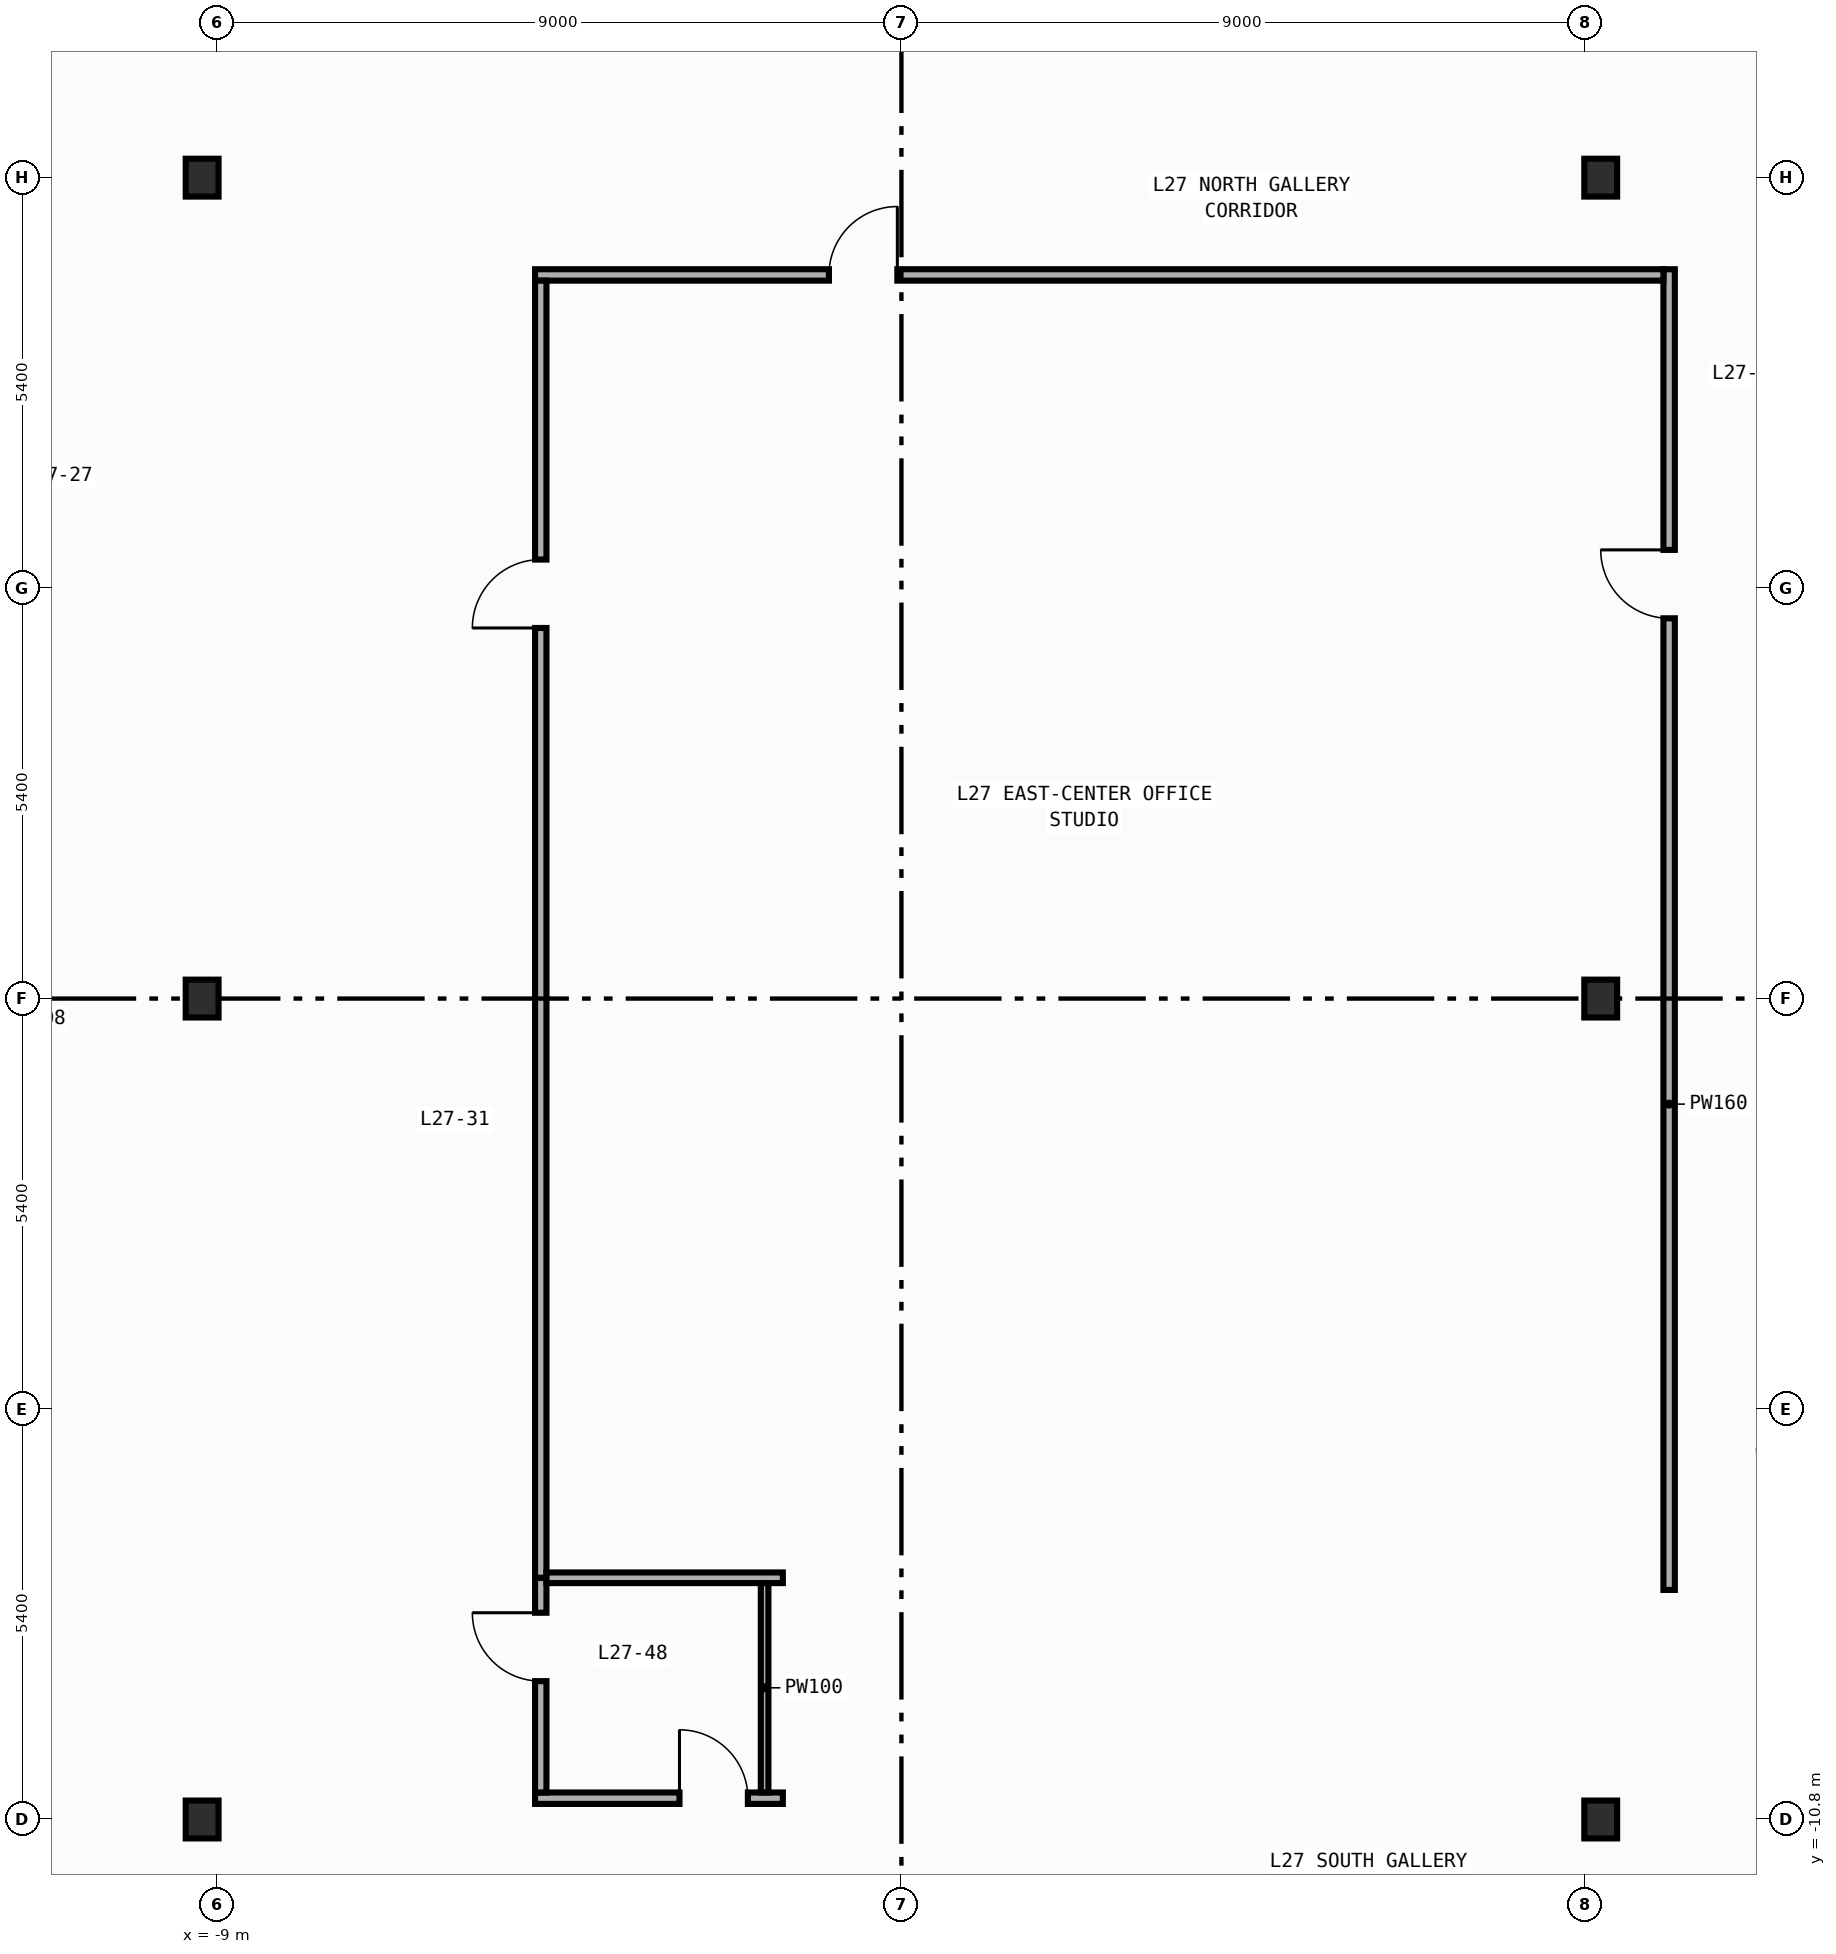
"""IFC4 building model, lengths in metres.
Left out: names, types, materials, properties, quantities, classifications, styles, units other than length and angle.
Written with IfcOpenShell. Run it as: python <this file> out.ifc"""

import sys

from ifc_helpers import new_model, si_unit, direction, frame, frame_2d, origin, origin_2d, place, context, subcontext, project, spatial, rectangle, i_section, extrude, element, fill, save


model = new_model("IFC4")
c1 = context("Model", 3, precision=1e-05, world=origin(), true_north=direction((0.0, 1.0)))
c2 = subcontext(c1, "Body", "Model", "MODEL_VIEW")
j1 = project(units=[si_unit("LENGTHUNIT", "METRE"), si_unit("PLANEANGLEUNIT", "RADIAN")], contexts=[c1])
p1 = place(None, origin())
s1 = spatial("IfcSite", under=j1, at=p1, CompositionType="ELEMENT")
p2 = place(p1, origin())
s2 = spatial("IfcBuilding", under=s1, at=p2, CompositionType="ELEMENT")
p3 = place(p2, frame((0.0, 0.0, 118.4)))
s3 = spatial("IfcBuildingStorey", under=s2, at=p3, CompositionType="ELEMENT", Elevation=118.4)
for number, where, z_axis, x_axis in (
    (1, (-9.2, -10.8, 0.0), (0.0, 0.0, 1.0), (1.0, 0.0, 0.0)),
    (2, (-9.2, 0.0, 0.0), (0.0, 0.0, 1.0), (1.0, 0.0, 0.0)),
    (3, (-9.2, 10.8, 0.0), (0.0, 0.0, 1.0), (1.0, 0.0, 0.0)),
    (4, (9.2, -10.8, 0.0), (0.0, 0.0, 1.0), (1.0, 0.0, 0.0)),
    (5, (9.2, 0.0, 0.0), (0.0, 0.0, 1.0), (1.0, 0.0, 0.0)),
    (6, (9.2, 10.8, 0.0), (0.0, 0.0, 1.0), (1.0, 0.0, 0.0)),
):
    element("IfcColumn", number, at=place(p3, frame(where, z_axis=z_axis, x_axis=x_axis)), inside=s3, PredefinedType="COLUMN", context=c2, shape_type="SweptSolid", body=[
        extrude(i_section(OverallWidth=0.432, OverallDepth=0.498, WebThickness=0.045, FlangeThickness=0.07, FilletRadius=0.022, at=origin_2d()), origin(), (0.0, 0.0, 1.0), 4.2),
    ])
p4 = place(p3, frame((10.1, -7.78, 0.0), z_axis=(0.0, 0.0, 1.0), x_axis=(0.0, 1.0, 0.0)))
e7 = element("IfcWall", 7, at=p4, inside=s3, PredefinedType="PARTITIONING", context=c2, shape_type="SweptSolid", body=[
    extrude(rectangle(XDim=17.375, YDim=0.15, at=frame_2d((8.688, 0.0))), origin(), (0.0, 0.0, 1.0), 3.94),
])
p5 = place(p4, frame((12.783, 0.0, 0.0)))
e8 = element("IfcOpeningElement", 8, at=p5, cuts=e7, PredefinedType="OPENING", context=c2, shape_type="SweptSolid", body=[
    extrude(rectangle(XDim=0.9, YDim=2.15, at=frame_2d((0.45, 1.075))), frame((0.0, 0.085, 0.0), z_axis=(0.0, -1.0, 0.0), x_axis=(1.0, 0.0, 0.0)), (0.0, 0.0, 1.0), 0.17),
])
p6 = place(p3, frame((-4.82, 9.52, 0.0), z_axis=(0.0, 0.0, 1.0), x_axis=(1.0, 0.0, 0.0)))
e9 = element("IfcWall", 9, at=p6, inside=s3, PredefinedType="PARTITIONING", context=c2, shape_type="SweptSolid", body=[
    extrude(rectangle(XDim=14.845, YDim=0.15, at=frame_2d((7.422, 0.0))), origin(), (0.0, 0.0, 1.0), 3.94),
])
p7 = place(p6, frame((3.866, 0.0, 0.0)))
e10 = element("IfcOpeningElement", 10, at=p7, cuts=e9, PredefinedType="OPENING", context=c2, shape_type="SweptSolid", body=[
    extrude(rectangle(XDim=0.9, YDim=2.15, at=frame_2d((0.45, 1.075))), frame((0.0, 0.085, 0.0), z_axis=(0.0, -1.0, 0.0), x_axis=(1.0, 0.0, 0.0)), (0.0, 0.0, 1.0), 0.17),
])
p8 = place(p3, frame((-4.82, -10.52, 0.0), z_axis=(0.0, 0.0, 1.0), x_axis=(1.0, 0.0, 0.0)))
e11 = element("IfcWall", 11, at=p8, inside=s3, PredefinedType="PARTITIONING", context=c2, shape_type="SweptSolid", body=[
    extrude(rectangle(XDim=3.26, YDim=0.15, at=frame_2d((1.63, 0.0))), origin(), (0.0, 0.0, 1.0), 3.24),
])
p9 = place(p8, frame((1.9, 0.0, 0.0)))
e12 = element("IfcOpeningElement", 12, at=p9, cuts=e11, PredefinedType="OPENING", context=c2, shape_type="SweptSolid", body=[
    extrude(rectangle(XDim=0.9, YDim=2.15, at=frame_2d((0.45, 1.075))), frame((0.0, 0.085, 0.0), z_axis=(0.0, -1.0, 0.0), x_axis=(1.0, 0.0, 0.0)), (0.0, 0.0, 1.0), 0.17),
])
p10 = place(p3, frame((-4.745, -10.445, 0.0), z_axis=(0.0, 0.0, 1.0), x_axis=(0.0, 1.0, 0.0)))
e13 = element("IfcWall", 13, at=p10, inside=s3, PredefinedType="PARTITIONING", context=c2, shape_type="SweptSolid", body=[
    extrude(rectangle(XDim=2.825, YDim=0.15, at=frame_2d((1.413, 0.0))), origin(), (0.0, 0.0, 1.0), 3.49),
])
p11 = place(p10, frame((1.465, 0.0, 0.0)))
e14 = element("IfcOpeningElement", 14, at=p11, cuts=e13, PredefinedType="OPENING", context=c2, shape_type="SweptSolid", body=[
    extrude(rectangle(XDim=0.9, YDim=2.15, at=frame_2d((0.45, 1.075))), frame((0.0, 0.085, 0.0), z_axis=(0.0, -1.0, 0.0), x_axis=(1.0, 0.0, 0.0)), (0.0, 0.0, 1.0), 0.17),
])
p12 = place(p3, frame((-4.745, -7.62, 0.0), z_axis=(0.0, 0.0, 1.0), x_axis=(0.0, 1.0, 0.0)))
e15 = element("IfcWall", 15, at=p12, inside=s3, PredefinedType="PARTITIONING", context=c2, shape_type="SweptSolid", body=[
    extrude(rectangle(XDim=17.065, YDim=0.15, at=frame_2d((8.533, 0.0))), origin(), (0.0, 0.0, 1.0), 3.49),
])
p13 = place(p12, frame((12.496, 0.0, 0.0)))
e16 = element("IfcOpeningElement", 16, at=p13, cuts=e15, PredefinedType="OPENING", context=c2, shape_type="SweptSolid", body=[
    extrude(rectangle(XDim=0.9, YDim=2.15, at=frame_2d((0.45, 1.075))), frame((0.0, 0.085, 0.0), z_axis=(0.0, -1.0, 0.0), x_axis=(1.0, 0.0, 0.0)), (0.0, 0.0, 1.0), 0.17),
])
p14 = place(p3, frame((-4.67, -7.62, 0.0), z_axis=(0.0, 0.0, 1.0), x_axis=(1.0, 0.0, 0.0)))
e17 = element("IfcWall", 17, at=p14, inside=s3, PredefinedType="PARTITIONING", context=c2, shape_type="SweptSolid", body=[
    extrude(rectangle(XDim=3.11, YDim=0.14, at=frame_2d((1.555, 0.0))), origin(), (0.0, 0.0, 1.0), 3.94),
])
p15 = place(p3, frame((-1.8, -7.69, 0.0), z_axis=(0.0, 0.0, 1.0), x_axis=(0.0, -1.0, 0.0)))
e18 = element("IfcWall", 18, at=p15, inside=s3, PredefinedType="PARTITIONING", context=c2, shape_type="SweptSolid", body=[
    extrude(rectangle(XDim=2.755, YDim=0.1, at=frame_2d((1.377, 0.0))), origin(), (0.0, 0.0, 1.0), 3.94),
])
p16 = place(p5, origin())
e19 = element("IfcDoor", 19, at=p16, inside=s3, OperationType="SINGLE_SWING_RIGHT", PredefinedType="DOOR", context=c2, shape_type="SweptSolid", body=[
    extrude(rectangle(XDim=0.9, YDim=2.15, at=frame_2d((0.45, 1.075))), frame((0.0, 0.025, 0.0), z_axis=(0.0, -1.0, 0.0), x_axis=(1.0, 0.0, 0.0)), (0.0, 0.0, 1.0), 0.05),
])
fill(e8, e19)
p17 = place(p7, origin())
e20 = element("IfcDoor", 20, at=p17, inside=s3, OperationType="SINGLE_SWING_RIGHT", PredefinedType="DOOR", context=c2, shape_type="SweptSolid", body=[
    extrude(rectangle(XDim=0.9, YDim=2.15, at=frame_2d((0.45, 1.075))), frame((0.0, 0.025, 0.0), z_axis=(0.0, -1.0, 0.0), x_axis=(1.0, 0.0, 0.0)), (0.0, 0.0, 1.0), 0.05),
])
fill(e10, e20)
p18 = place(p9, origin())
e21 = element("IfcDoor", 21, at=p18, inside=s3, OperationType="SINGLE_SWING_LEFT", PredefinedType="DOOR", context=c2, shape_type="SweptSolid", body=[
    extrude(rectangle(XDim=0.9, YDim=2.15, at=frame_2d((0.45, 1.075))), frame((0.0, 0.025, 0.0), z_axis=(0.0, -1.0, 0.0), x_axis=(1.0, 0.0, 0.0)), (0.0, 0.0, 1.0), 0.05),
])
fill(e12, e21)
p19 = place(p11, origin())
e22 = element("IfcDoor", 22, at=p19, inside=s3, OperationType="SINGLE_SWING_RIGHT", PredefinedType="DOOR", context=c2, shape_type="SweptSolid", body=[
    extrude(rectangle(XDim=0.9, YDim=2.15, at=frame_2d((0.45, 1.075))), frame((0.0, 0.025, 0.0), z_axis=(0.0, -1.0, 0.0), x_axis=(1.0, 0.0, 0.0)), (0.0, 0.0, 1.0), 0.05),
])
fill(e14, e22)
p20 = place(p13, origin())
e23 = element("IfcDoor", 23, at=p20, inside=s3, OperationType="SINGLE_SWING_LEFT", PredefinedType="DOOR", context=c2, shape_type="SweptSolid", body=[
    extrude(rectangle(XDim=0.9, YDim=2.15, at=frame_2d((0.45, 1.075))), frame((0.0, 0.025, 0.0), z_axis=(0.0, -1.0, 0.0), x_axis=(1.0, 0.0, 0.0)), (0.0, 0.0, 1.0), 0.05),
])
fill(e16, e23)
save(model, sys.argv[1])
